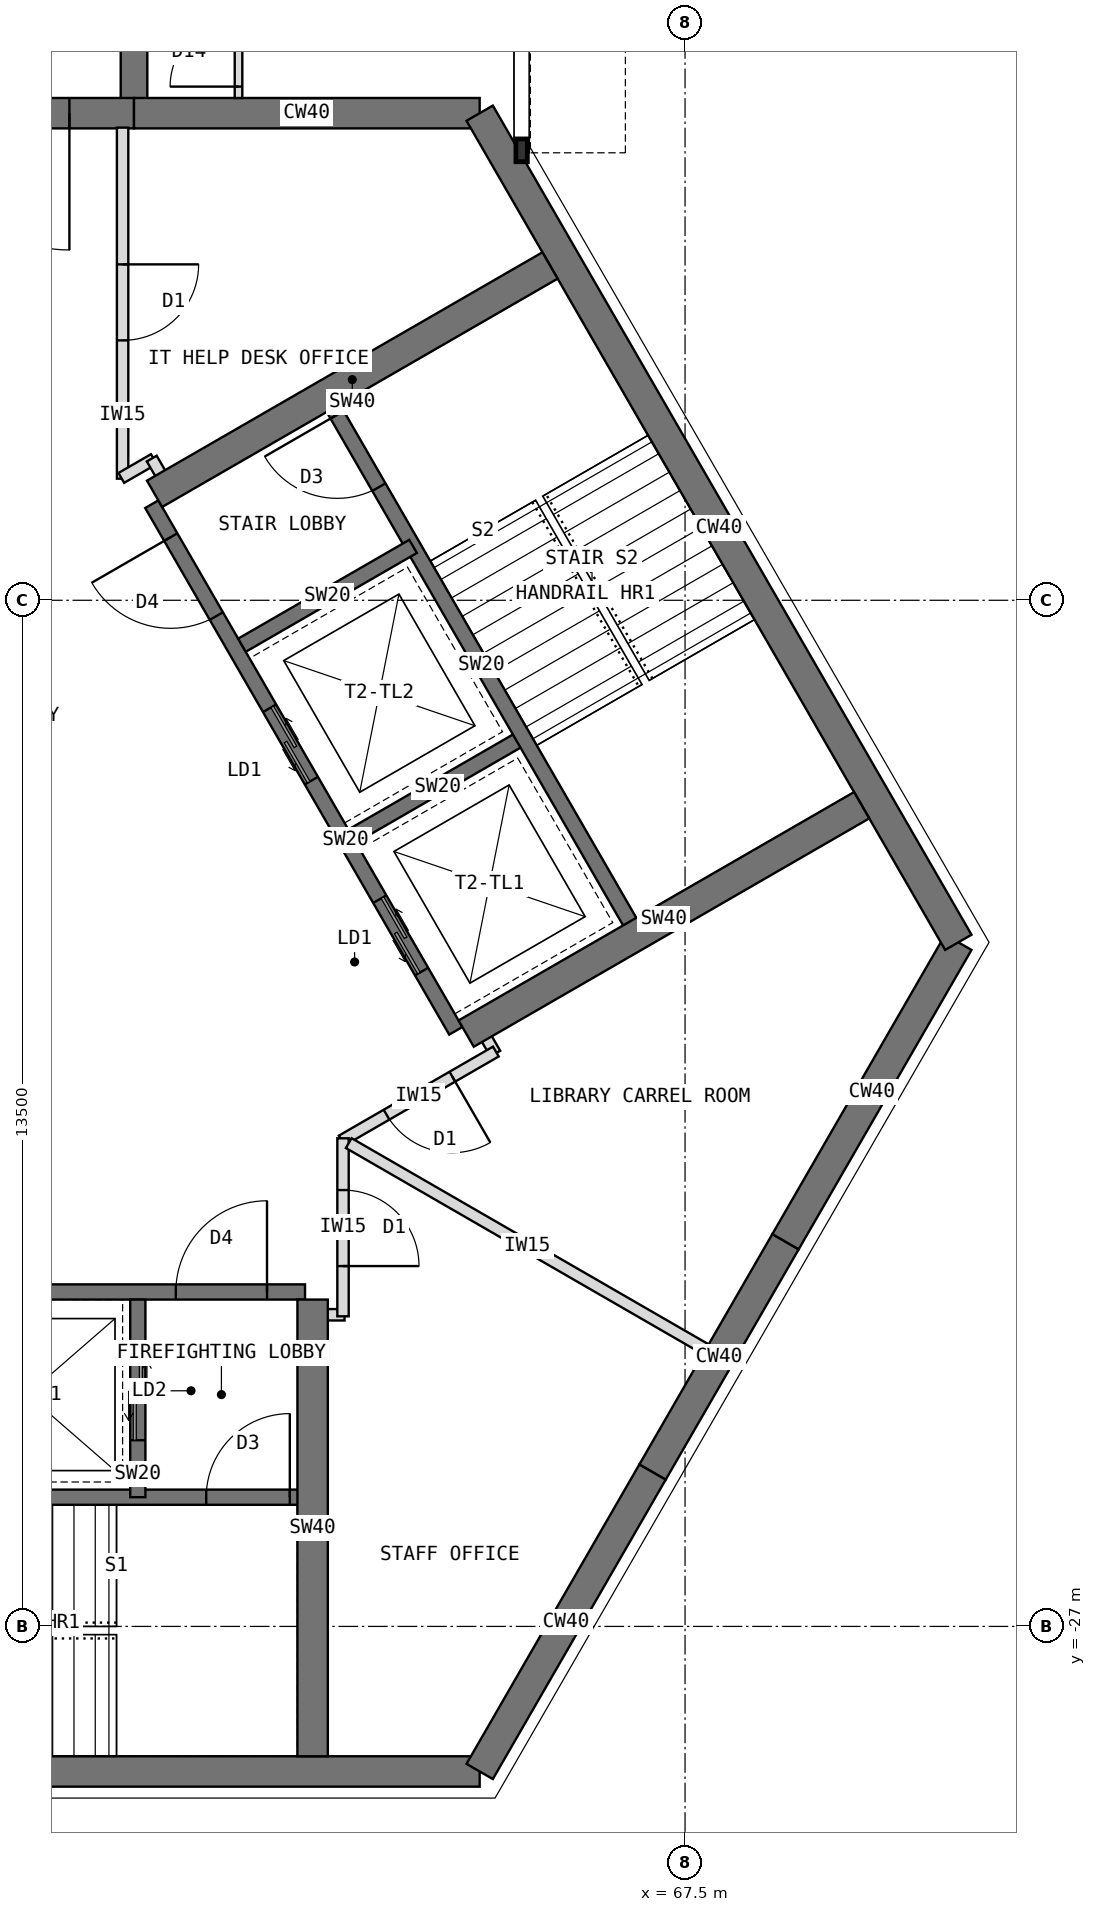
"""IFC4 building model, lengths in metres.
Left out: names, types, materials, properties, quantities, classifications, styles, units other than length and angle.
Written with IfcOpenShell. Run it as: python <this file> out.ifc"""

import sys

from ifc_helpers import new_model, si_unit, direction, frame, frame_2d, origin, place, context, subcontext, project, spatial, rectangle, extrude, element, fill, save


model = new_model("IFC4")
c1 = context("Model", 3, precision=1e-05, world=origin(), true_north=direction((0.0, 1.0)))
c2 = subcontext(c1, "Body", "Model", "MODEL_VIEW")
j1 = project(units=[si_unit("LENGTHUNIT", "METRE"), si_unit("PLANEANGLEUNIT", "RADIAN")], contexts=[c1])
p1 = place(None, origin())
s1 = spatial("IfcSite", under=j1, at=p1, CompositionType="ELEMENT")
p2 = place(p1, origin())
s2 = spatial("IfcBuilding", under=s1, at=p2, CompositionType="ELEMENT")
p3 = place(p2, frame((0.0, 0.0, 267.5)))
s3 = spatial("IfcBuildingStorey", under=s2, at=p3, CompositionType="ELEMENT", Elevation=267.5)
p4 = place(p3, frame((64.798, -7.092, 0.0), z_axis=(0.0, 0.0, 1.0), x_axis=(-1.0, 0.0, 0.0)))
e1 = element("IfcWall", 1, at=p4, inside=s3, PredefinedType="SHEAR", context=c2, shape_type="SweptSolid", body=[
    extrude(rectangle(XDim=4.548, YDim=0.4, at=frame_2d((2.274, 0.0))), origin(), (0.0, 0.0, 1.0), 4.0),
])
p5 = place(p3, frame((60.25, -7.092, 0.0), z_axis=(0.0, 0.0, 1.0), x_axis=(-1.0, 0.0, 0.0)))
e2 = element("IfcWall", 2, at=p5, inside=s3, PredefinedType="SHEAR", context=c2, shape_type="SweptSolid", body=[
    extrude(rectangle(XDim=3.5, YDim=0.4, at=frame_2d((1.75, 0.0))), origin(), (0.0, 0.0, 1.0), 4.0),
])
p6 = place(p5, frame((0.85, 0.0, 0.0)))
e3 = element("IfcOpeningElement", 3, at=p6, cuts=e2, PredefinedType="OPENING", context=c2, shape_type="SweptSolid", body=[
    extrude(rectangle(XDim=1.8, YDim=2.1, at=frame_2d((0.9, 1.05))), frame((0.0, 0.21, 0.0), z_axis=(0.0, -1.0, 0.0), x_axis=(1.0, 0.0, 0.0)), (0.0, 0.0, 1.0), 0.42),
])
p7 = place(p3, frame((52.202, -28.908, 0.0), z_axis=(0.0, 0.0, 1.0), x_axis=(1.0, 0.0, 0.0)))
e4 = element("IfcWall", 4, at=p7, inside=s3, PredefinedType="SHEAR", context=c2, shape_type="SweptSolid", body=[
    extrude(rectangle(XDim=12.596, YDim=0.4, at=frame_2d((6.298, 0.0))), origin(), (0.0, 0.0, 1.0), 4.0),
])
p8 = place(p3, frame((64.798, -28.908, 0.0), z_axis=(0.0, 0.0, 1.0), x_axis=(0.499984222037, 0.866034513004, 0.0)))
e5 = element("IfcWall", 5, at=p8, inside=s3, PredefinedType="SHEAR", context=c2, shape_type="SweptSolid", body=[
    extrude(rectangle(XDim=4.548, YDim=0.4, at=frame_2d((2.274, 0.0))), origin(), (0.0, 0.0, 1.0), 4.0),
])
p9 = place(p3, frame((67.072, -24.97, 0.0), z_axis=(0.0, 0.0, 1.0), x_axis=(0.500010275428, 0.866019471182, 0.0)))
e6 = element("IfcWall", 6, at=p9, inside=s3, PredefinedType="SHEAR", context=c2, shape_type="SweptSolid", body=[
    extrude(rectangle(XDim=3.5, YDim=0.4, at=frame_2d((1.75, 0.0))), origin(), (0.0, 0.0, 1.0), 4.0),
])
p10 = place(p3, frame((68.822, -21.939, 0.0), z_axis=(0.0, 0.0, 1.0), x_axis=(0.500024481964, 0.866011268655, 0.0)))
e7 = element("IfcWall", 7, at=p10, inside=s3, PredefinedType="SHEAR", context=c2, shape_type="SweptSolid", body=[
    extrude(rectangle(XDim=4.548, YDim=0.4, at=frame_2d((2.274, 0.0))), origin(), (0.0, 0.0, 1.0), 4.0),
])
p11 = place(p3, frame((71.096, -18.0, 0.0), z_axis=(0.0, 0.0, 1.0), x_axis=(-0.500005998175, 0.866021940709, 0.0)))
e8 = element("IfcWall", 8, at=p11, inside=s3, PredefinedType="SHEAR", context=c2, shape_type="SweptSolid", body=[
    extrude(rectangle(XDim=12.596, YDim=0.4, at=frame_2d((6.298, 0.0))), origin(), (0.0, 0.0, 1.0), 4.0),
])
p12 = place(p3, frame((60.25, -7.092, 0.0), z_axis=(0.0, 0.0, 1.0), x_axis=(0.0, 1.0, 0.0)))
e9 = element("IfcWall", 9, at=p12, inside=s3, PredefinedType="SHEAR", context=c2, shape_type="SweptSolid", body=[
    extrude(rectangle(XDim=2.592, YDim=0.35, at=frame_2d((1.296, 0.0))), origin(), (0.0, 0.0, 1.0), 4.0),
])
p13 = place(p3, frame((54.5, -22.6, 0.0), z_axis=(0.0, 0.0, 1.0), x_axis=(1.0, 0.0, 0.0)))
e10 = element("IfcWall", 10, at=p13, inside=s3, PredefinedType="SHEAR", context=c2, shape_type="SweptSolid", body=[
    extrude(rectangle(XDim=8.0, YDim=0.2, at=frame_2d((4.0, 0.0))), origin(), (0.0, 0.0, 1.0), 4.0),
])
p14 = place(p13, frame((6.3, 0.0, 0.0)))
e11 = element("IfcOpeningElement", 11, at=p14, cuts=e10, PredefinedType="OPENING", context=c2, shape_type="SweptSolid", body=[
    extrude(rectangle(XDim=1.2, YDim=2.1, at=frame_2d((0.6, 1.05))), frame((0.0, 0.11, 0.0), z_axis=(0.0, -1.0, 0.0), x_axis=(1.0, 0.0, 0.0)), (0.0, 0.0, 1.0), 0.22),
])
p15 = place(p13, frame((0.9, 0.0, 0.0)))
e12 = element("IfcOpeningElement", 12, at=p15, cuts=e10, PredefinedType="OPENING", context=c2, shape_type="SweptSolid", body=[
    extrude(rectangle(XDim=1.1, YDim=2.2, at=frame_2d((0.55, 1.1))), frame((0.0, 0.11, 0.0), z_axis=(0.0, -1.0, 0.0), x_axis=(1.0, 0.0, 0.0)), (0.0, 0.0, 1.0), 0.22),
])
p16 = place(p3, frame((60.3, -22.7, 0.0), z_axis=(0.0, 0.0, 1.0), x_axis=(0.0, -1.0, 0.0)))
e13 = element("IfcWall", 13, at=p16, inside=s3, PredefinedType="SHEAR", context=c2, shape_type="SweptSolid", body=[
    extrude(rectangle(XDim=2.6, YDim=0.2, at=frame_2d((1.3, 0.0))), origin(), (0.0, 0.0, 1.0), 4.0),
])
p17 = place(p16, frame((0.55, 0.0, 0.0)))
e14 = element("IfcOpeningElement", 14, at=p17, cuts=e13, PredefinedType="OPENING", context=c2, shape_type="SweptSolid", body=[
    extrude(rectangle(XDim=1.3, YDim=2.2, at=frame_2d((0.65, 1.1))), frame((0.0, 0.11, 0.0), z_axis=(0.0, -1.0, 0.0), x_axis=(1.0, 0.0, 0.0)), (0.0, 0.0, 1.0), 0.22),
])
p18 = place(p3, frame((54.5, -25.3, 0.0), z_axis=(0.0, 0.0, 1.0), x_axis=(1.0, 0.0, 0.0)))
e15 = element("IfcWall", 15, at=p18, inside=s3, PredefinedType="SHEAR", context=c2, shape_type="SweptSolid", body=[
    extrude(rectangle(XDim=8.0, YDim=0.2, at=frame_2d((4.0, 0.0))), origin(), (0.0, 0.0, 1.0), 4.0),
])
p19 = place(p18, frame((6.7, 0.0, 0.0)))
e16 = element("IfcOpeningElement", 16, at=p19, cuts=e15, PredefinedType="OPENING", context=c2, shape_type="SweptSolid", body=[
    extrude(rectangle(XDim=1.1, YDim=2.1, at=frame_2d((0.55, 1.05))), frame((0.0, 0.11, 0.0), z_axis=(0.0, -1.0, 0.0), x_axis=(1.0, 0.0, 0.0)), (0.0, 0.0, 1.0), 0.22),
])
p20 = place(p3, frame((62.6, -22.7, 0.0), z_axis=(0.0, 0.0, 1.0), x_axis=(0.0, -1.0, 0.0)))
e17 = element("IfcWall", 17, at=p20, inside=s3, PredefinedType="SHEAR", context=c2, shape_type="SweptSolid", body=[
    extrude(rectangle(XDim=6.008, YDim=0.4, at=frame_2d((3.004, 0.0))), origin(), (0.0, 0.0, 1.0), 4.0),
])
p21 = place(p3, frame((64.484, -19.164, 0.0), z_axis=(0.0, 0.0, 1.0), x_axis=(-0.49999894854, 0.866026010844, 0.0)))
e18 = element("IfcWall", 18, at=p21, inside=s3, PredefinedType="SHEAR", context=c2, shape_type="SweptSolid", body=[
    extrude(rectangle(XDim=8.0, YDim=0.2, at=frame_2d((4.0, 0.0))), origin(), (0.0, 0.0, 1.0), 4.0),
])
p22 = place(p21, frame((6.3, 0.0, 0.0)))
e19 = element("IfcOpeningElement", 19, at=p22, cuts=e18, PredefinedType="OPENING", context=c2, shape_type="SweptSolid", body=[
    extrude(rectangle(XDim=1.2, YDim=2.1, at=frame_2d((0.6, 1.05))), frame((0.0, 0.11, 0.0), z_axis=(0.0, -1.0, 0.0), x_axis=(1.0, 0.0, 0.0)), (0.0, 0.0, 1.0), 0.22),
])
p23 = place(p21, frame((0.9, 0.0, 0.0)))
e20 = element("IfcOpeningElement", 20, at=p23, cuts=e18, PredefinedType="OPENING", context=c2, shape_type="SweptSolid", body=[
    extrude(rectangle(XDim=1.1, YDim=2.2, at=frame_2d((0.55, 1.1))), frame((0.0, 0.11, 0.0), z_axis=(0.0, -1.0, 0.0), x_axis=(1.0, 0.0, 0.0)), (0.0, 0.0, 1.0), 0.22),
])
p24 = place(p21, frame((3.8, 0.0, 0.0)))
e21 = element("IfcOpeningElement", 21, at=p24, cuts=e18, PredefinedType="OPENING", context=c2, shape_type="SweptSolid", body=[
    extrude(rectangle(XDim=1.1, YDim=2.2, at=frame_2d((0.55, 1.1))), frame((0.0, 0.11, 0.0), z_axis=(0.0, -1.0, 0.0), x_axis=(1.0, 0.0, 0.0)), (0.0, 0.0, 1.0), 0.22),
])
p25 = place(p3, frame((63.12, -16.603, 0.0), z_axis=(0.0, 0.0, 1.0), x_axis=(0.866062058628, 0.499936506574, 0.0)))
e22 = element("IfcWall", 22, at=p25, inside=s3, PredefinedType="SHEAR", context=c2, shape_type="SweptSolid", body=[
    extrude(rectangle(XDim=2.6, YDim=0.2, at=frame_2d((1.3, 0.0))), origin(), (0.0, 0.0, 1.0), 4.0),
])
p26 = place(p3, frame((61.67, -14.091, 0.0), z_axis=(0.0, 0.0, 1.0), x_axis=(0.86603858612, 0.49997716683, 0.0)))
e23 = element("IfcWall", 23, at=p26, inside=s3, PredefinedType="SHEAR", context=c2, shape_type="SweptSolid", body=[
    extrude(rectangle(XDim=2.6, YDim=0.2, at=frame_2d((1.3, 0.0))), origin(), (0.0, 0.0, 1.0), 4.0),
])
p27 = place(p3, frame((66.822, -17.814, 0.0), z_axis=(0.0, 0.0, 1.0), x_axis=(-0.49999894854, 0.866026010844, 0.0)))
e24 = element("IfcWall", 24, at=p27, inside=s3, PredefinedType="SHEAR", context=c2, shape_type="SweptSolid", body=[
    extrude(rectangle(XDim=8.0, YDim=0.2, at=frame_2d((4.0, 0.0))), origin(), (0.0, 0.0, 1.0), 4.0),
])
p28 = place(p27, frame((6.7, 0.0, 0.0)))
e25 = element("IfcOpeningElement", 25, at=p28, cuts=e24, PredefinedType="OPENING", context=c2, shape_type="SweptSolid", body=[
    extrude(rectangle(XDim=1.1, YDim=2.1, at=frame_2d((0.55, 1.05))), frame((0.0, 0.11, 0.0), z_axis=(0.0, -1.0, 0.0), x_axis=(1.0, 0.0, 0.0)), (0.0, 0.0, 1.0), 0.22),
])
for number, where, z_axis, x_axis in (
    (26, (60.52, -12.099, 0.0), (0.0, 0.0, 1.0), (0.866, 0.5, 0.0)),
    (27, (64.62, -19.201, 0.0), (0.0, 0.0, 1.0), (0.866, 0.5, 0.0)),
):
    element("IfcWall", number, at=place(p3, frame(where, z_axis=z_axis, x_axis=x_axis)), inside=s3, PredefinedType="SHEAR", context=c2, shape_type="SweptSolid", body=[
        extrude(rectangle(XDim=6.008, YDim=0.4, at=frame_2d((3.004, 0.0))), origin(), (0.0, 0.0, 1.0), 4.0),
    ])
p29 = place(p3, frame((61.625, -6.892, 0.0), z_axis=(0.0, 0.0, 1.0), x_axis=(0.0, 1.0, 0.0)))
e28 = element("IfcWall", 28, at=p29, inside=s3, PredefinedType="PARTITIONING", context=c2, shape_type="SweptSolid", body=[
    extrude(rectangle(XDim=2.4, YDim=0.1, at=frame_2d((1.2, 0.0))), origin(), (0.0, 0.0, 1.0), 3.8),
])
p30 = place(p29, frame((0.15, 0.0, 0.0)))
e29 = element("IfcOpeningElement", 29, at=p30, cuts=e28, PredefinedType="OPENING", context=c2, shape_type="SweptSolid", body=[
    extrude(rectangle(XDim=0.9, YDim=2.1, at=frame_2d((0.45, 1.05))), frame((0.0, 0.06, 0.0), z_axis=(0.0, -1.0, 0.0), x_axis=(1.0, 0.0, 0.0)), (0.0, 0.0, 1.0), 0.12),
])
p31 = place(p3, frame((63.02, -22.9, 0.0), z_axis=(0.0, 0.0, 1.0), x_axis=(-1.0, 0.0, 0.0)))
e30 = element("IfcWall", 30, at=p31, inside=s3, PredefinedType="PARTITIONING", context=c2, shape_type="SweptSolid", body=[
    extrude(rectangle(XDim=0.43, YDim=0.15, at=frame_2d((0.215, 0.0))), origin(), (0.0, 0.0, 1.0), 3.8),
])
p32 = place(p3, frame((60.1, -7.282, 0.0), z_axis=(0.0, 0.0, 1.0), x_axis=(0.0, -1.0, 0.0)))
e31 = element("IfcWall", 31, at=p32, inside=s3, PredefinedType="PARTITIONING", context=c2, shape_type="SweptSolid", body=[
    extrude(rectangle(XDim=4.618, YDim=0.15, at=frame_2d((2.309, 0.0))), origin(), (0.0, 0.0, 1.0), 3.8),
])
p33 = place(p32, frame((1.799, 0.0, 0.0)))
e32 = element("IfcOpeningElement", 32, at=p33, cuts=e31, PredefinedType="OPENING", context=c2, shape_type="SweptSolid", body=[
    extrude(rectangle(XDim=1.0, YDim=2.1, at=frame_2d((0.5, 1.05))), frame((0.0, 0.085, 0.0), z_axis=(0.0, -1.0, 0.0), x_axis=(1.0, 0.0, 0.0)), (0.0, 0.0, 1.0), 0.17),
])
p34 = place(p3, frame((60.083, -11.89, 0.0), z_axis=(0.0, 0.0, 1.0), x_axis=(0.865831790172, 0.50033519877, 0.0)))
e33 = element("IfcWall", 33, at=p34, inside=s3, PredefinedType="PARTITIONING", context=c2, shape_type="SweptSolid", body=[
    extrude(rectangle(XDim=0.494, YDim=0.15, at=frame_2d((0.247, 0.0))), origin(), (0.0, 0.0, 1.0), 3.8),
])
for number, where, z_axis, x_axis in (
    (34, (60.483, -11.635, 0.0), (0.0, 0.0, 1.0), (0.5, -0.866, 0.0)),
    (35, (64.789, -19.092, 0.0), (0.0, 0.0, 1.0), (0.5, -0.866, 0.0)),
):
    element("IfcWall", number, at=place(p3, frame(where, z_axis=z_axis, x_axis=x_axis)), inside=s3, PredefinedType="PARTITIONING", context=c2, shape_type="SweptSolid", body=[
        extrude(rectangle(XDim=0.43, YDim=0.15, at=frame_2d((0.215, 0.0))), origin(), (0.0, 0.0, 1.0), 3.8),
    ])
p35 = place(p3, frame((65.011, -19.437, 0.0), z_axis=(0.0, 0.0, 1.0), x_axis=(-0.865982457891, -0.500074377092, 0.0)))
e36 = element("IfcWall", 36, at=p35, inside=s3, PredefinedType="PARTITIONING", context=c2, shape_type="SweptSolid", body=[
    extrude(rectangle(XDim=2.342, YDim=0.15, at=frame_2d((1.171, 0.0))), origin(), (0.0, 0.0, 1.0), 3.8),
])
p36 = place(p35, frame((0.661, 0.0, 0.0)))
e37 = element("IfcOpeningElement", 37, at=p36, cuts=e36, PredefinedType="OPENING", context=c2, shape_type="SweptSolid", body=[
    extrude(rectangle(XDim=1.0, YDim=2.1, at=frame_2d((0.5, 1.05))), frame((0.0, 0.085, 0.0), z_axis=(0.0, -1.0, 0.0), x_axis=(1.0, 0.0, 0.0)), (0.0, 0.0, 1.0), 0.17),
])
p37 = place(p3, frame((63.0, -20.578, 0.0), z_axis=(0.0, 0.0, 1.0), x_axis=(0.0, -1.0, 0.0)))
e38 = element("IfcWall", 38, at=p37, inside=s3, PredefinedType="PARTITIONING", context=c2, shape_type="SweptSolid", body=[
    extrude(rectangle(XDim=2.342, YDim=0.15, at=frame_2d((1.171, 0.0))), origin(), (0.0, 0.0, 1.0), 3.8),
])
p38 = place(p37, frame((0.681, 0.0, 0.0)))
e39 = element("IfcOpeningElement", 39, at=p38, cuts=e38, PredefinedType="OPENING", context=c2, shape_type="SweptSolid", body=[
    extrude(rectangle(XDim=1.0, YDim=2.1, at=frame_2d((0.5, 1.05))), frame((0.0, 0.085, 0.0), z_axis=(0.0, -1.0, 0.0), x_axis=(1.0, 0.0, 0.0)), (0.0, 0.0, 1.0), 0.17),
])
p39 = place(p3, frame((63.075, -20.641, 0.0), z_axis=(0.0, 0.0, 1.0), x_axis=(0.866019232626, -0.500010688608, 0.0)))
e40 = element("IfcWall", 40, at=p39, inside=s3, PredefinedType="PARTITIONING", context=c2, shape_type="SweptSolid", body=[
    extrude(rectangle(XDim=5.426, YDim=0.15, at=frame_2d((2.713, 0.0))), origin(), (0.0, 0.0, 1.0), 3.8),
])
p40 = place(p14, origin())
e41 = element("IfcDoor", 41, at=p40, inside=s3, OperationType="SINGLE_SWING_RIGHT", PredefinedType="DOOR", context=c2, shape_type="SweptSolid", body=[
    extrude(rectangle(XDim=1.2, YDim=2.1, at=frame_2d((0.6, 1.05))), frame((0.0, 0.025, 0.0), z_axis=(0.0, -1.0, 0.0), x_axis=(1.0, 0.0, 0.0)), (0.0, 0.0, 1.0), 0.05),
])
fill(e11, e41)
p41 = place(p17, origin())
e42 = element("IfcDoor", 42, at=p41, inside=s3, OperationType="DOUBLE_DOOR_SLIDING", PredefinedType="DOOR", context=c2, shape_type="SweptSolid", body=[
    extrude(rectangle(XDim=1.3, YDim=2.2, at=frame_2d((0.65, 1.1))), frame((0.0, 0.025, 0.0), z_axis=(0.0, -1.0, 0.0), x_axis=(1.0, 0.0, 0.0)), (0.0, 0.0, 1.0), 0.05),
])
fill(e14, e42)
p42 = place(p19, origin())
e43 = element("IfcDoor", 43, at=p42, inside=s3, OperationType="SINGLE_SWING_RIGHT", PredefinedType="DOOR", context=c2, shape_type="SweptSolid", body=[
    extrude(rectangle(XDim=1.1, YDim=2.1, at=frame_2d((0.55, 1.05))), frame((0.0, 0.025, 0.0), z_axis=(0.0, -1.0, 0.0), x_axis=(1.0, 0.0, 0.0)), (0.0, 0.0, 1.0), 0.05),
])
fill(e16, e43)
p43 = place(p22, origin())
e44 = element("IfcDoor", 44, at=p43, inside=s3, OperationType="SINGLE_SWING_RIGHT", PredefinedType="DOOR", context=c2, shape_type="SweptSolid", body=[
    extrude(rectangle(XDim=1.2, YDim=2.1, at=frame_2d((0.6, 1.05))), frame((0.0, 0.025, 0.0), z_axis=(0.0, -1.0, 0.0), x_axis=(1.0, 0.0, 0.0)), (0.0, 0.0, 1.0), 0.05),
])
fill(e19, e44)
p44 = place(p23, origin())
e45 = element("IfcDoor", 45, at=p44, inside=s3, OperationType="DOUBLE_DOOR_SLIDING", PredefinedType="DOOR", context=c2, shape_type="SweptSolid", body=[
    extrude(rectangle(XDim=1.1, YDim=2.2, at=frame_2d((0.55, 1.1))), frame((0.0, 0.025, 0.0), z_axis=(0.0, -1.0, 0.0), x_axis=(1.0, 0.0, 0.0)), (0.0, 0.0, 1.0), 0.05),
])
fill(e20, e45)
p45 = place(p24, origin())
e46 = element("IfcDoor", 46, at=p45, inside=s3, OperationType="DOUBLE_DOOR_SLIDING", PredefinedType="DOOR", context=c2, shape_type="SweptSolid", body=[
    extrude(rectangle(XDim=1.1, YDim=2.2, at=frame_2d((0.55, 1.1))), frame((0.0, 0.025, 0.0), z_axis=(0.0, -1.0, 0.0), x_axis=(1.0, 0.0, 0.0)), (0.0, 0.0, 1.0), 0.05),
])
fill(e21, e46)
p46 = place(p28, origin())
e47 = element("IfcDoor", 47, at=p46, inside=s3, OperationType="SINGLE_SWING_RIGHT", PredefinedType="DOOR", context=c2, shape_type="SweptSolid", body=[
    extrude(rectangle(XDim=1.1, YDim=2.1, at=frame_2d((0.55, 1.05))), frame((0.0, 0.025, 0.0), z_axis=(0.0, -1.0, 0.0), x_axis=(1.0, 0.0, 0.0)), (0.0, 0.0, 1.0), 0.05),
])
fill(e25, e47)
p47 = place(p6, origin())
e48 = element("IfcDoor", 48, at=p47, inside=s3, OperationType="DOUBLE_DOOR_DOUBLE_SWING", PredefinedType="DOOR", context=c2, shape_type="SweptSolid", body=[
    extrude(rectangle(XDim=1.8, YDim=2.1, at=frame_2d((0.9, 1.05))), frame((0.0, 0.025, 0.0), z_axis=(0.0, -1.0, 0.0), x_axis=(1.0, 0.0, 0.0)), (0.0, 0.0, 1.0), 0.05),
])
fill(e3, e48)
p48 = place(p30, origin())
e49 = element("IfcDoor", 49, at=p48, inside=s3, OperationType="SINGLE_SWING_LEFT", PredefinedType="DOOR", context=c2, shape_type="SweptSolid", body=[
    extrude(rectangle(XDim=0.9, YDim=2.1, at=frame_2d((0.45, 1.05))), frame((0.0, 0.025, 0.0), z_axis=(0.0, -1.0, 0.0), x_axis=(1.0, 0.0, 0.0)), (0.0, 0.0, 1.0), 0.05),
])
fill(e29, e49)
p49 = place(p38, origin())
e50 = element("IfcDoor", 50, at=p49, inside=s3, OperationType="SINGLE_SWING_RIGHT", PredefinedType="DOOR", context=c2, shape_type="SweptSolid", body=[
    extrude(rectangle(XDim=1.0, YDim=2.1, at=frame_2d((0.5, 1.05))), frame((0.0, 0.025, 0.0), z_axis=(0.0, -1.0, 0.0), x_axis=(1.0, 0.0, 0.0)), (0.0, 0.0, 1.0), 0.05),
])
fill(e39, e50)
p50 = place(p36, origin())
e51 = element("IfcDoor", 51, at=p50, inside=s3, OperationType="SINGLE_SWING_LEFT", PredefinedType="DOOR", context=c2, shape_type="SweptSolid", body=[
    extrude(rectangle(XDim=1.0, YDim=2.1, at=frame_2d((0.5, 1.05))), frame((0.0, 0.025, 0.0), z_axis=(0.0, -1.0, 0.0), x_axis=(1.0, 0.0, 0.0)), (0.0, 0.0, 1.0), 0.05),
])
fill(e37, e51)
p51 = place(p33, origin())
e52 = element("IfcDoor", 52, at=p51, inside=s3, OperationType="SINGLE_SWING_LEFT", PredefinedType="DOOR", context=c2, shape_type="SweptSolid", body=[
    extrude(rectangle(XDim=1.0, YDim=2.1, at=frame_2d((0.5, 1.05))), frame((0.0, 0.025, 0.0), z_axis=(0.0, -1.0, 0.0), x_axis=(1.0, 0.0, 0.0)), (0.0, 0.0, 1.0), 0.05),
])
fill(e32, e52)
save(model, sys.argv[1])
